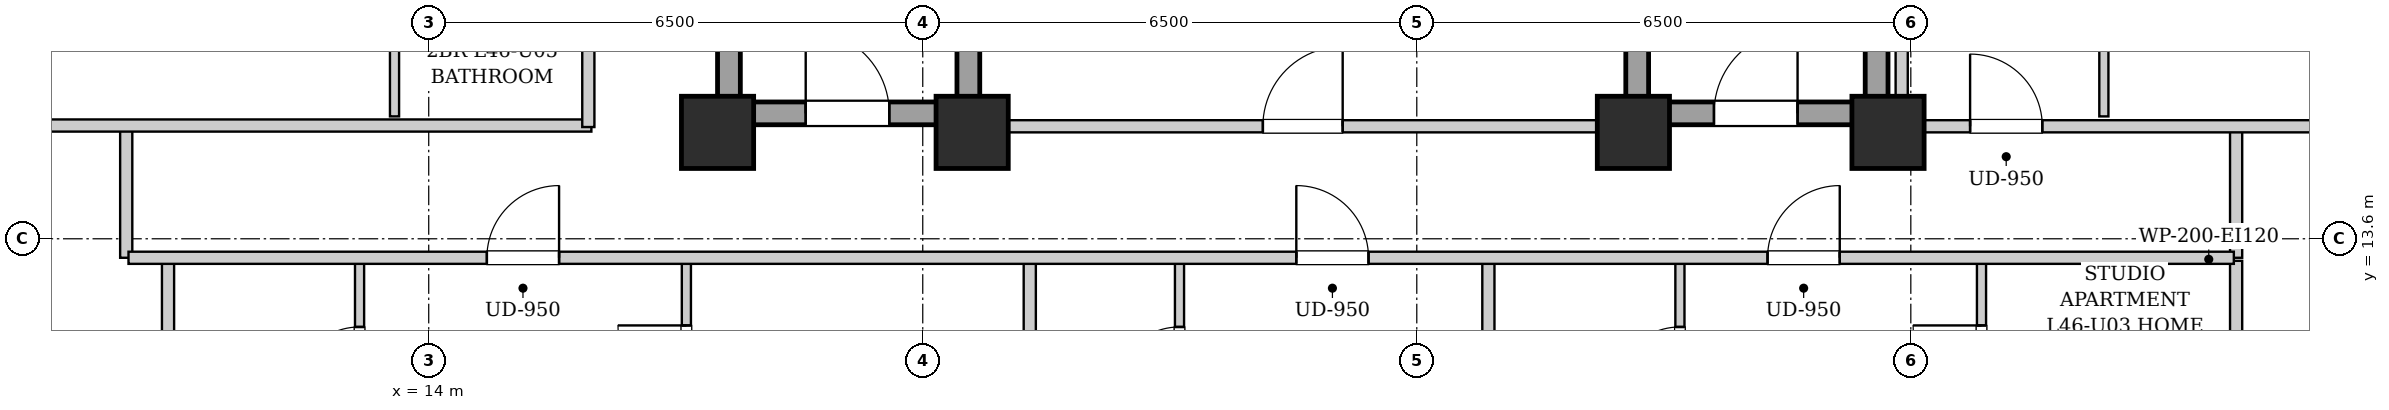
"""IFC4 building model, lengths in metres.
Left out: names, types, materials, properties, quantities, classifications, styles, units other than length and angle.
Written with IfcOpenShell. Run it as: python <this file> out.ifc"""

import sys

from ifc_helpers import new_model, si_unit, direction, frame, frame_2d, origin, origin_2d, place, context, subcontext, project, spatial, rectangle, extrude, element, fill, save


model = new_model("IFC4")
c1 = context("Model", 3, precision=1e-05, world=origin(), true_north=direction((0.0, 1.0)))
c2 = subcontext(c1, "Body", "Model", "MODEL_VIEW")
j1 = project(units=[si_unit("LENGTHUNIT", "METRE"), si_unit("PLANEANGLEUNIT", "RADIAN")], contexts=[c1])
p1 = place(None, origin())
s1 = spatial("IfcSite", under=j1, at=p1, CompositionType="ELEMENT")
p2 = place(p1, origin())
s2 = spatial("IfcBuilding", under=s1, at=p2, CompositionType="ELEMENT")
p3 = place(p2, frame((0.0, 0.0, 160.15)))
s3 = spatial("IfcBuildingStorey", under=s2, at=p3, CompositionType="ELEMENT", Elevation=160.15)
for number, where, z_axis, x_axis in (
    (1, (17.8, 15.0, 0.0), (0.0, 0.0, 1.0), (1.0, 0.0, 0.0)),
    (2, (21.15, 15.0, 0.0), (0.0, 0.0, 1.0), (1.0, 0.0, 0.0)),
    (3, (29.85, 15.0, 0.0), (0.0, 0.0, 1.0), (1.0, 0.0, 0.0)),
    (4, (33.2, 15.0, 0.0), (0.0, 0.0, 1.0), (1.0, 0.0, 0.0)),
):
    element("IfcColumn", number, at=place(p3, frame(where, z_axis=z_axis, x_axis=x_axis)), inside=s3, PredefinedType="COLUMN", context=c2, shape_type="SweptSolid", body=[
        extrude(rectangle(XDim=0.95, YDim=0.95, at=origin_2d()), origin(), (0.0, 0.0, 1.0), 3.25),
    ])
for number, where, z_axis, x_axis in (
    (5, (17.95, 15.1, 0.0), (0.0, 0.0, 1.0), (0.0, 1.0, 0.0)),
    (6, (21.1, 15.1, 0.0), (0.0, 0.0, 1.0), (0.0, 1.0, 0.0)),
):
    element("IfcWall", number, at=place(p3, frame(where, z_axis=z_axis, x_axis=x_axis)), inside=s3, PredefinedType="SHEAR", context=c2, shape_type="SweptSolid", body=[
        extrude(rectangle(XDim=9.0, YDim=0.3, at=frame_2d((4.5, 0.0))), origin(), (0.0, 0.0, 1.0), 2.99),
    ])
p4 = place(p3, frame((18.1, 15.25, 0.0), z_axis=(0.0, 0.0, 1.0), x_axis=(1.0, 0.0, 0.0)))
e7 = element("IfcWall", 7, at=p4, inside=s3, PredefinedType="SHEAR", context=c2, shape_type="SweptSolid", body=[
    extrude(rectangle(XDim=2.85, YDim=0.3, at=frame_2d((1.425, 0.0))), origin(), (0.0, 0.0, 1.0), 2.99),
])
p5 = place(p4, frame((0.86, 0.0, 0.0)))
e8 = element("IfcOpeningElement", 8, at=p5, cuts=e7, PredefinedType="OPENING", context=c2, shape_type="SweptSolid", body=[
    extrude(rectangle(XDim=1.1, YDim=2.05, at=frame_2d((0.55, 1.025))), frame((0.0, 0.16, 0.0), z_axis=(0.0, -1.0, 0.0), x_axis=(1.0, 0.0, 0.0)), (0.0, 0.0, 1.0), 0.32),
])
for number, where, z_axis, x_axis in (
    (9, (29.9, 15.1, 0.0), (0.0, 0.0, 1.0), (0.0, 1.0, 0.0)),
    (10, (33.05, 15.1, 0.0), (0.0, 0.0, 1.0), (0.0, 1.0, 0.0)),
):
    element("IfcWall", number, at=place(p3, frame(where, z_axis=z_axis, x_axis=x_axis)), inside=s3, PredefinedType="SHEAR", context=c2, shape_type="SweptSolid", body=[
        extrude(rectangle(XDim=9.0, YDim=0.3, at=frame_2d((4.5, 0.0))), origin(), (0.0, 0.0, 1.0), 2.99),
    ])
p6 = place(p3, frame((30.05, 15.25, 0.0), z_axis=(0.0, 0.0, 1.0), x_axis=(1.0, 0.0, 0.0)))
e11 = element("IfcWall", 11, at=p6, inside=s3, PredefinedType="SHEAR", context=c2, shape_type="SweptSolid", body=[
    extrude(rectangle(XDim=2.85, YDim=0.3, at=frame_2d((1.425, 0.0))), origin(), (0.0, 0.0, 1.0), 2.99),
])
p7 = place(p6, frame((0.86, 0.0, 0.0)))
e12 = element("IfcOpeningElement", 12, at=p7, cuts=e11, PredefinedType="OPENING", context=c2, shape_type="SweptSolid", body=[
    extrude(rectangle(XDim=1.1, YDim=2.05, at=frame_2d((0.55, 1.025))), frame((0.0, 0.16, 0.0), z_axis=(0.0, -1.0, 0.0), x_axis=(1.0, 0.0, 0.0)), (0.0, 0.0, 1.0), 0.32),
])
p8 = place(p3, frame((21.25, 15.08, 0.0), z_axis=(0.0, 0.0, 1.0), x_axis=(1.0, 0.0, 0.0)))
e13 = element("IfcWall", 13, at=p8, inside=s3, PredefinedType="PARTITIONING", context=c2, shape_type="SweptSolid", body=[
    extrude(rectangle(XDim=8.5, YDim=0.16, at=frame_2d((4.25, 0.0))), origin(), (0.0, 0.0, 1.0), 2.442),
])
p9 = place(p8, frame((3.725, 0.0, 0.0)))
e14 = element("IfcOpeningElement", 14, at=p9, cuts=e13, PredefinedType="OPENING", context=c2, shape_type="SweptSolid", body=[
    extrude(rectangle(XDim=1.05, YDim=2.05, at=frame_2d((0.525, 1.025))), frame((0.0, 0.09, 0.0), z_axis=(0.0, -1.0, 0.0), x_axis=(1.0, 0.0, 0.0)), (0.0, 0.0, 1.0), 0.18),
])
for number, where, z_axis, x_axis in (
    (15, (10.02, 13.35, 0.0), (0.0, 0.0, 1.0), (0.0, 1.0, 0.0)),
    (16, (37.78, 13.35, 0.0), (0.0, 0.0, 1.0), (0.0, 1.0, 0.0)),
):
    element("IfcWall", number, at=place(p3, frame(where, z_axis=z_axis, x_axis=x_axis)), inside=s3, PredefinedType="PARTITIONING", context=c2, shape_type="SweptSolid", body=[
        extrude(rectangle(XDim=1.74, YDim=0.16, at=frame_2d((0.87, 0.0))), origin(), (0.0, 0.0, 1.0), 2.99),
    ])
p10 = place(p3, frame((7.78, 15.09, 0.0), z_axis=(0.0, 0.0, 1.0), x_axis=(1.0, 0.0, 0.0)))
e17 = element("IfcWall", 17, at=p10, inside=s3, PredefinedType="PARTITIONING", context=c2, shape_type="SweptSolid", body=[
    extrude(rectangle(XDim=8.36, YDim=0.16, at=frame_2d((4.18, 0.0))), origin(), (0.0, 0.0, 1.0), 2.442),
])
p11 = place(p3, frame((10.57, 4.08, 0.0), z_axis=(0.0, 0.0, 1.0), x_axis=(0.0, 1.0, 0.0)))
e18 = element("IfcWall", 18, at=p11, inside=s3, PredefinedType="PARTITIONING", context=c2, shape_type="SweptSolid", body=[
    extrude(rectangle(XDim=9.23, YDim=0.16, at=frame_2d((4.615, 0.0))), origin(), (0.0, 0.0, 1.0), 2.99),
])
p12 = place(p3, frame((13.09, 10.71, 0.0), z_axis=(0.0, 0.0, 1.0), x_axis=(0.0, 1.0, 0.0)))
e19 = element("IfcWall", 19, at=p12, inside=s3, PredefinedType="PARTITIONING", context=c2, shape_type="SweptSolid", body=[
    extrude(rectangle(XDim=2.6, YDim=0.12, at=frame_2d((1.3, 0.0))), origin(), (0.0, 0.0, 1.0), 2.99),
])
p13 = place(p12, frame((0.87, 0.0, 0.0)))
e20 = element("IfcOpeningElement", 20, at=p13, cuts=e19, PredefinedType="OPENING", context=c2, shape_type="SweptSolid", body=[
    extrude(rectangle(XDim=0.86, YDim=2.05, at=frame_2d((0.43, 1.025))), frame((0.0, 0.07, 0.0), z_axis=(0.0, -1.0, 0.0), x_axis=(1.0, 0.0, 0.0)), (0.0, 0.0, 1.0), 0.14),
])
p14 = place(p3, frame((17.39, 10.71, 0.0), z_axis=(0.0, 0.0, 1.0), x_axis=(0.0, 1.0, 0.0)))
e21 = element("IfcWall", 21, at=p14, inside=s3, PredefinedType="PARTITIONING", context=c2, shape_type="SweptSolid", body=[
    extrude(rectangle(XDim=2.6, YDim=0.12, at=frame_2d((1.3, 0.0))), origin(), (0.0, 0.0, 1.0), 2.99),
])
p15 = place(p14, frame((0.85, 0.0, 0.0)))
e22 = element("IfcOpeningElement", 22, at=p15, cuts=e21, PredefinedType="OPENING", context=c2, shape_type="SweptSolid", body=[
    extrude(rectangle(XDim=0.9, YDim=2.05, at=frame_2d((0.45, 1.025))), frame((0.0, 0.07, 0.0), z_axis=(0.0, -1.0, 0.0), x_axis=(1.0, 0.0, 0.0)), (0.0, 0.0, 1.0), 0.14),
])
p16 = place(p3, frame((21.908, 4.08, 0.0), z_axis=(0.0, 0.0, 1.0), x_axis=(0.0, 1.0, 0.0)))
e23 = element("IfcWall", 23, at=p16, inside=s3, PredefinedType="PARTITIONING", context=c2, shape_type="SweptSolid", body=[
    extrude(rectangle(XDim=9.23, YDim=0.16, at=frame_2d((4.615, 0.0))), origin(), (0.0, 0.0, 1.0), 2.99),
])
p17 = place(p3, frame((23.878, 10.71, 0.0), z_axis=(0.0, 0.0, 1.0), x_axis=(0.0, 1.0, 0.0)))
e24 = element("IfcWall", 24, at=p17, inside=s3, PredefinedType="PARTITIONING", context=c2, shape_type="SweptSolid", body=[
    extrude(rectangle(XDim=2.6, YDim=0.12, at=frame_2d((1.3, 0.0))), origin(), (0.0, 0.0, 1.0), 2.99),
])
p18 = place(p17, frame((0.87, 0.0, 0.0)))
e25 = element("IfcOpeningElement", 25, at=p18, cuts=e24, PredefinedType="OPENING", context=c2, shape_type="SweptSolid", body=[
    extrude(rectangle(XDim=0.86, YDim=2.05, at=frame_2d((0.43, 1.025))), frame((0.0, 0.07, 0.0), z_axis=(0.0, -1.0, 0.0), x_axis=(1.0, 0.0, 0.0)), (0.0, 0.0, 1.0), 0.14),
])
p19 = place(p3, frame((37.78, 10.65, 0.0), z_axis=(0.0, 0.0, 1.0), x_axis=(0.0, 1.0, 0.0)))
e26 = element("IfcWall", 26, at=p19, inside=s3, PredefinedType="PARTITIONING", context=c2, shape_type="SweptSolid", body=[
    extrude(rectangle(XDim=2.66, YDim=0.16, at=frame_2d((1.33, 0.0))), origin(), (0.0, 0.0, 1.0), 2.99),
])
p20 = place(p3, frame((27.942, 4.08, 0.0), z_axis=(0.0, 0.0, 1.0), x_axis=(0.0, 1.0, 0.0)))
e27 = element("IfcWall", 27, at=p20, inside=s3, PredefinedType="PARTITIONING", context=c2, shape_type="SweptSolid", body=[
    extrude(rectangle(XDim=9.23, YDim=0.16, at=frame_2d((4.615, 0.0))), origin(), (0.0, 0.0, 1.0), 2.99),
])
p21 = place(p3, frame((30.462, 10.71, 0.0), z_axis=(0.0, 0.0, 1.0), x_axis=(0.0, 1.0, 0.0)))
e28 = element("IfcWall", 28, at=p21, inside=s3, PredefinedType="PARTITIONING", context=c2, shape_type="SweptSolid", body=[
    extrude(rectangle(XDim=2.6, YDim=0.12, at=frame_2d((1.3, 0.0))), origin(), (0.0, 0.0, 1.0), 2.99),
])
p22 = place(p21, frame((0.87, 0.0, 0.0)))
e29 = element("IfcOpeningElement", 29, at=p22, cuts=e28, PredefinedType="OPENING", context=c2, shape_type="SweptSolid", body=[
    extrude(rectangle(XDim=0.86, YDim=2.05, at=frame_2d((0.43, 1.025))), frame((0.0, 0.07, 0.0), z_axis=(0.0, -1.0, 0.0), x_axis=(1.0, 0.0, 0.0)), (0.0, 0.0, 1.0), 0.14),
])
p23 = place(p3, frame((34.43, 10.71, 0.0), z_axis=(0.0, 0.0, 1.0), x_axis=(0.0, 1.0, 0.0)))
e30 = element("IfcWall", 30, at=p23, inside=s3, PredefinedType="PARTITIONING", context=c2, shape_type="SweptSolid", body=[
    extrude(rectangle(XDim=2.6, YDim=0.12, at=frame_2d((1.3, 0.0))), origin(), (0.0, 0.0, 1.0), 2.99),
])
p24 = place(p23, frame((0.85, 0.0, 0.0)))
e31 = element("IfcOpeningElement", 31, at=p24, cuts=e30, PredefinedType="OPENING", context=c2, shape_type="SweptSolid", body=[
    extrude(rectangle(XDim=0.9, YDim=2.05, at=frame_2d((0.45, 1.025))), frame((0.0, 0.07, 0.0), z_axis=(0.0, -1.0, 0.0), x_axis=(1.0, 0.0, 0.0)), (0.0, 0.0, 1.0), 0.14),
])
p25 = place(p3, frame((13.55, 15.21, 0.0), z_axis=(0.0, 0.0, 1.0), x_axis=(0.0, 1.0, 0.0)))
e32 = element("IfcWall", 32, at=p25, inside=s3, PredefinedType="PARTITIONING", context=c2, shape_type="SweptSolid", body=[
    extrude(rectangle(XDim=2.3, YDim=0.12, at=frame_2d((1.15, 0.0))), origin(), (0.0, 0.0, 1.0), 2.99),
])
p26 = place(p3, frame((33.38, 15.08, 0.0), z_axis=(0.0, 0.0, 1.0), x_axis=(1.0, 0.0, 0.0)))
e33 = element("IfcWall", 33, at=p26, inside=s3, PredefinedType="PARTITIONING", context=c2, shape_type="SweptSolid", body=[
    extrude(rectangle(XDim=6.64, YDim=0.16, at=frame_2d((3.32, 0.0))), origin(), (0.0, 0.0, 1.0), 2.442),
])
p27 = place(p26, frame((0.9, 0.0, 0.0)))
e34 = element("IfcOpeningElement", 34, at=p27, cuts=e33, PredefinedType="OPENING", context=c2, shape_type="SweptSolid", body=[
    extrude(rectangle(XDim=0.95, YDim=2.1, at=frame_2d((0.475, 1.05))), frame((0.0, 0.09, 0.0), z_axis=(0.0, -1.0, 0.0), x_axis=(1.0, 0.0, 0.0)), (0.0, 0.0, 1.0), 0.18),
])
p28 = place(p3, frame((36.04, 15.21, 0.0), z_axis=(0.0, 0.0, 1.0), x_axis=(0.0, 1.0, 0.0)))
e35 = element("IfcWall", 35, at=p28, inside=s3, PredefinedType="PARTITIONING", context=c2, shape_type="SweptSolid", body=[
    extrude(rectangle(XDim=4.308, YDim=0.12, at=frame_2d((2.154, 0.0))), origin(), (0.0, 0.0, 1.0), 2.99),
])
p29 = place(p28, frame((1.704, 0.0, 0.0)))
e36 = element("IfcOpeningElement", 36, at=p29, cuts=e35, PredefinedType="OPENING", context=c2, shape_type="SweptSolid", body=[
    extrude(rectangle(XDim=0.9, YDim=2.05, at=frame_2d((0.45, 1.025))), frame((0.0, 0.07, 0.0), z_axis=(0.0, -1.0, 0.0), x_axis=(1.0, 0.0, 0.0)), (0.0, 0.0, 1.0), 0.14),
])
p30 = place(p3, frame((10.05, 13.35, 0.0), z_axis=(0.0, 0.0, 1.0), x_axis=(1.0, 0.0, 0.0)))
e37 = element("IfcWall", 37, at=p30, inside=s3, PredefinedType="PARTITIONING", context=c2, shape_type="SweptSolid", body=[
    extrude(rectangle(XDim=27.7, YDim=0.16, at=frame_2d((13.85, 0.0))), origin(), (0.0, 0.0, 1.0), 2.99),
])
p31 = place(p30, frame((4.715, 0.0, 0.0)))
e38 = element("IfcOpeningElement", 38, at=p31, cuts=e37, PredefinedType="OPENING", context=c2, shape_type="SweptSolid", body=[
    extrude(rectangle(XDim=0.95, YDim=2.1, at=frame_2d((0.475, 1.05))), frame((0.0, 0.09, 0.0), z_axis=(0.0, -1.0, 0.0), x_axis=(1.0, 0.0, 0.0)), (0.0, 0.0, 1.0), 0.18),
])
p32 = place(p30, frame((15.365, 0.0, 0.0)))
e39 = element("IfcOpeningElement", 39, at=p32, cuts=e37, PredefinedType="OPENING", context=c2, shape_type="SweptSolid", body=[
    extrude(rectangle(XDim=0.95, YDim=2.1, at=frame_2d((0.475, 1.05))), frame((0.0, 0.09, 0.0), z_axis=(0.0, -1.0, 0.0), x_axis=(1.0, 0.0, 0.0)), (0.0, 0.0, 1.0), 0.18),
])
p33 = place(p30, frame((21.565, 0.0, 0.0)))
e40 = element("IfcOpeningElement", 40, at=p33, cuts=e37, PredefinedType="OPENING", context=c2, shape_type="SweptSolid", body=[
    extrude(rectangle(XDim=0.95, YDim=2.1, at=frame_2d((0.475, 1.05))), frame((0.0, 0.09, 0.0), z_axis=(0.0, -1.0, 0.0), x_axis=(1.0, 0.0, 0.0)), (0.0, 0.0, 1.0), 0.18),
])
p34 = place(p3, frame((16.1, 15.07, 0.0), z_axis=(0.0, 0.0, 1.0), x_axis=(0.0, 1.0, 0.0)))
e41 = element("IfcWall", 41, at=p34, inside=s3, PredefinedType="PARTITIONING", context=c2, shape_type="SweptSolid", body=[
    extrude(rectangle(XDim=13.93, YDim=0.16, at=frame_2d((6.965, 0.0))), origin(), (0.0, 0.0, 1.0), 2.99),
])
p35 = place(p34, frame((4.385, 0.0, 0.0)))
e42 = element("IfcOpeningElement", 42, at=p35, cuts=e41, PredefinedType="OPENING", context=c2, shape_type="SweptSolid", body=[
    extrude(rectangle(XDim=0.95, YDim=2.1, at=frame_2d((0.475, 1.05))), frame((0.0, 0.09, 0.0), z_axis=(0.0, -1.0, 0.0), x_axis=(1.0, 0.0, 0.0)), (0.0, 0.0, 1.0), 0.18),
])
p36 = place(p3, frame((33.38, 15.02, 0.0), z_axis=(0.0, 0.0, 1.0), x_axis=(0.0, 1.0, 0.0)))
e43 = element("IfcWall", 43, at=p36, inside=s3, PredefinedType="PARTITIONING", context=c2, shape_type="SweptSolid", body=[
    extrude(rectangle(XDim=13.98, YDim=0.16, at=frame_2d((6.99, 0.0))), origin(), (0.0, 0.0, 1.0), 2.99),
])
p37 = place(p5, origin())
e44 = element("IfcDoor", 44, at=p37, inside=s3, OperationType="SINGLE_SWING_LEFT", PredefinedType="DOOR", context=c2, shape_type="SweptSolid", body=[
    extrude(rectangle(XDim=1.1, YDim=2.05, at=frame_2d((0.55, 1.025))), frame((0.0, 0.025, 0.0), z_axis=(0.0, -1.0, 0.0), x_axis=(1.0, 0.0, 0.0)), (0.0, 0.0, 1.0), 0.05),
])
fill(e8, e44)
p38 = place(p7, origin())
e45 = element("IfcDoor", 45, at=p38, inside=s3, OperationType="SINGLE_SWING_RIGHT", PredefinedType="DOOR", context=c2, shape_type="SweptSolid", body=[
    extrude(rectangle(XDim=1.1, YDim=2.05, at=frame_2d((0.55, 1.025))), frame((0.0, 0.025, 0.0), z_axis=(0.0, -1.0, 0.0), x_axis=(1.0, 0.0, 0.0)), (0.0, 0.0, 1.0), 0.05),
])
fill(e12, e45)
p39 = place(p9, origin())
e46 = element("IfcDoor", 46, at=p39, inside=s3, OperationType="SINGLE_SWING_RIGHT", PredefinedType="DOOR", context=c2, shape_type="SweptSolid", body=[
    extrude(rectangle(XDim=1.05, YDim=2.05, at=frame_2d((0.525, 1.025))), frame((0.0, 0.025, 0.0), z_axis=(0.0, -1.0, 0.0), x_axis=(1.0, 0.0, 0.0)), (0.0, 0.0, 1.0), 0.05),
])
fill(e14, e46)
p40 = place(p13, origin())
e47 = element("IfcDoor", 47, at=p40, inside=s3, OperationType="SINGLE_SWING_LEFT", PredefinedType="DOOR", context=c2, shape_type="SweptSolid", body=[
    extrude(rectangle(XDim=0.86, YDim=2.05, at=frame_2d((0.43, 1.025))), frame((0.0, 0.025, 0.0), z_axis=(0.0, -1.0, 0.0), x_axis=(1.0, 0.0, 0.0)), (0.0, 0.0, 1.0), 0.05),
])
fill(e20, e47)
p41 = place(p15, origin())
e48 = element("IfcDoor", 48, at=p41, inside=s3, OperationType="SINGLE_SWING_RIGHT", PredefinedType="DOOR", context=c2, shape_type="SweptSolid", body=[
    extrude(rectangle(XDim=0.9, YDim=2.05, at=frame_2d((0.45, 1.025))), frame((0.0, 0.025, 0.0), z_axis=(0.0, -1.0, 0.0), x_axis=(1.0, 0.0, 0.0)), (0.0, 0.0, 1.0), 0.05),
])
fill(e22, e48)
p42 = place(p18, origin())
e49 = element("IfcDoor", 49, at=p42, inside=s3, OperationType="SINGLE_SWING_LEFT", PredefinedType="DOOR", context=c2, shape_type="SweptSolid", body=[
    extrude(rectangle(XDim=0.86, YDim=2.05, at=frame_2d((0.43, 1.025))), frame((0.0, 0.025, 0.0), z_axis=(0.0, -1.0, 0.0), x_axis=(1.0, 0.0, 0.0)), (0.0, 0.0, 1.0), 0.05),
])
fill(e25, e49)
p43 = place(p22, origin())
e50 = element("IfcDoor", 50, at=p43, inside=s3, OperationType="SINGLE_SWING_LEFT", PredefinedType="DOOR", context=c2, shape_type="SweptSolid", body=[
    extrude(rectangle(XDim=0.86, YDim=2.05, at=frame_2d((0.43, 1.025))), frame((0.0, 0.025, 0.0), z_axis=(0.0, -1.0, 0.0), x_axis=(1.0, 0.0, 0.0)), (0.0, 0.0, 1.0), 0.05),
])
fill(e29, e50)
p44 = place(p24, origin())
e51 = element("IfcDoor", 51, at=p44, inside=s3, OperationType="SINGLE_SWING_RIGHT", PredefinedType="DOOR", context=c2, shape_type="SweptSolid", body=[
    extrude(rectangle(XDim=0.9, YDim=2.05, at=frame_2d((0.45, 1.025))), frame((0.0, 0.025, 0.0), z_axis=(0.0, -1.0, 0.0), x_axis=(1.0, 0.0, 0.0)), (0.0, 0.0, 1.0), 0.05),
])
fill(e31, e51)
p45 = place(p27, origin())
e52 = element("IfcDoor", 52, at=p45, inside=s3, OperationType="SINGLE_SWING_LEFT", PredefinedType="DOOR", context=c2, shape_type="SweptSolid", body=[
    extrude(rectangle(XDim=0.95, YDim=2.1, at=frame_2d((0.475, 1.05))), frame((0.0, 0.025, 0.0), z_axis=(0.0, -1.0, 0.0), x_axis=(1.0, 0.0, 0.0)), (0.0, 0.0, 1.0), 0.05),
])
fill(e34, e52)
p46 = place(p31, origin())
e53 = element("IfcDoor", 53, at=p46, inside=s3, OperationType="SINGLE_SWING_RIGHT", PredefinedType="DOOR", context=c2, shape_type="SweptSolid", body=[
    extrude(rectangle(XDim=0.95, YDim=2.1, at=frame_2d((0.475, 1.05))), frame((0.0, 0.025, 0.0), z_axis=(0.0, -1.0, 0.0), x_axis=(1.0, 0.0, 0.0)), (0.0, 0.0, 1.0), 0.05),
])
fill(e38, e53)
p47 = place(p32, origin())
e54 = element("IfcDoor", 54, at=p47, inside=s3, OperationType="SINGLE_SWING_LEFT", PredefinedType="DOOR", context=c2, shape_type="SweptSolid", body=[
    extrude(rectangle(XDim=0.95, YDim=2.1, at=frame_2d((0.475, 1.05))), frame((0.0, 0.025, 0.0), z_axis=(0.0, -1.0, 0.0), x_axis=(1.0, 0.0, 0.0)), (0.0, 0.0, 1.0), 0.05),
])
fill(e39, e54)
p48 = place(p33, origin())
e55 = element("IfcDoor", 55, at=p48, inside=s3, OperationType="SINGLE_SWING_RIGHT", PredefinedType="DOOR", context=c2, shape_type="SweptSolid", body=[
    extrude(rectangle(XDim=0.95, YDim=2.1, at=frame_2d((0.475, 1.05))), frame((0.0, 0.025, 0.0), z_axis=(0.0, -1.0, 0.0), x_axis=(1.0, 0.0, 0.0)), (0.0, 0.0, 1.0), 0.05),
])
fill(e40, e55)
save(model, sys.argv[1])
